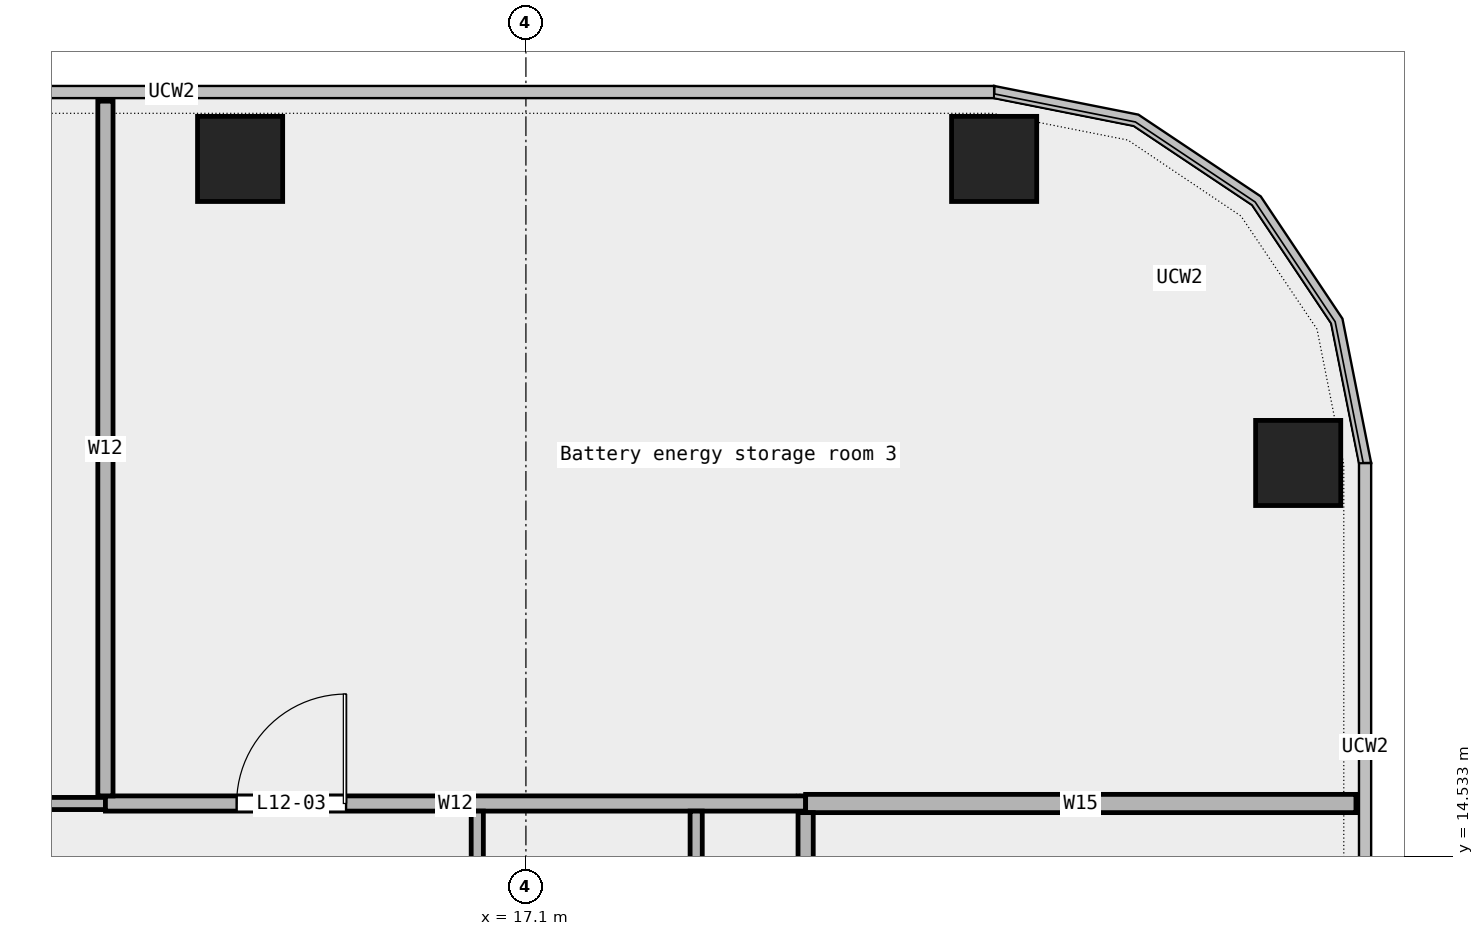
"""IFC4 building model, lengths in metres.
Left out: names, types, materials, properties, quantities, classifications, styles, units other than length and angle.
Written with IfcOpenShell. Run it as: python <this file> out.ifc"""

import sys

from ifc_helpers import new_model, si_unit, direction, frame, frame_2d, origin, origin_2d, place, context, subcontext, project, spatial, rectangle, extrude, element, fill, save


model = new_model("IFC4")
c1 = context("Model", 3, precision=1e-05, world=origin(), true_north=direction((0.0, 1.0)))
c2 = subcontext(c1, "Body", "Model", "MODEL_VIEW")
j1 = project(units=[si_unit("LENGTHUNIT", "METRE"), si_unit("PLANEANGLEUNIT", "RADIAN")], contexts=[c1])
p1 = place(None, origin())
s1 = spatial("IfcSite", under=j1, at=p1, CompositionType="ELEMENT")
p2 = place(p1, origin())
s2 = spatial("IfcBuilding", under=s1, at=p2, CompositionType="ELEMENT")
p3 = place(p2, frame((0.0, 0.0, 64.6)))
s3 = spatial("IfcBuildingStorey", under=s2, at=p3, CompositionType="ELEMENT", Elevation=64.6)
for number, where, z_axis, x_axis in (
    (1, (29.8, 21.0, 0.0), (0.0, 0.0, 1.0), (1.0, 0.0, 0.0)),
    (2, (24.8, 26.0, 0.0), (0.0, 0.0, 1.0), (1.0, 0.0, 0.0)),
    (3, (12.4, 26.0, 0.0), (0.0, 0.0, 1.0), (1.0, 0.0, 0.0)),
):
    element("IfcColumn", number, at=place(p3, frame(where, z_axis=z_axis, x_axis=x_axis)), inside=s3, PredefinedType="COLUMN", context=c2, shape_type="SweptSolid", body=[
        extrude(rectangle(XDim=1.4, YDim=1.4, at=origin_2d()), origin(), (0.0, 0.0, 1.0), 4.35),
    ])
p4 = place(p3, frame((-15.78, 15.4, 0.0), z_axis=(0.0, 0.0, 1.0), x_axis=(1.0, 0.0, 0.0)))
e4 = element("IfcWall", 4, at=p4, inside=s3, PredefinedType="PARTITIONING", context=c2, shape_type="SweptSolid", body=[
    extrude(rectangle(XDim=25.965, YDim=0.2, at=frame_2d((12.982, 0.0))), origin(), (0.0, 0.0, 1.0), 4.35),
])
p5 = place(p4, frame((19.395, 0.0, 0.0)))
e5 = element("IfcOpeningElement", 5, at=p5, cuts=e4, PredefinedType="OPENING", context=c2, shape_type="SweptSolid", body=[
    extrude(rectangle(XDim=1.5, YDim=2.1, at=frame_2d((0.75, 1.05))), frame((0.0, 0.112, 0.0), z_axis=(0.0, -1.0, 0.0), x_axis=(1.0, 0.0, 0.0)), (0.0, 0.0, 1.0), 0.224),
])
p6 = place(p4, frame((6.012, 0.0, 0.0)))
e6 = element("IfcOpeningElement", 6, at=p6, cuts=e4, PredefinedType="OPENING", context=c2, shape_type="SweptSolid", body=[
    extrude(rectangle(XDim=1.5, YDim=2.1, at=frame_2d((0.75, 1.05))), frame((0.0, 0.112, 0.0), z_axis=(0.0, -1.0, 0.0), x_axis=(1.0, 0.0, 0.0)), (0.0, 0.0, 1.0), 0.224),
])
p7 = place(p3, frame((10.185, 15.4, 0.0), z_axis=(0.0, 0.0, 1.0), x_axis=(1.0, 0.0, 0.0)))
e7 = element("IfcWall", 7, at=p7, inside=s3, PredefinedType="PARTITIONING", context=c2, shape_type="SweptSolid", body=[
    extrude(rectangle(XDim=11.515, YDim=0.25, at=frame_2d((5.757, 0.0))), origin(), (0.0, 0.0, 1.0), 4.35),
])
p8 = place(p7, frame((2.157, 0.0, 0.0)))
e8 = element("IfcOpeningElement", 8, at=p8, cuts=e7, PredefinedType="OPENING", context=c2, shape_type="SweptSolid", body=[
    extrude(rectangle(XDim=1.8, YDim=2.1, at=frame_2d((0.9, 1.05))), frame((0.0, 0.137, 0.0), z_axis=(0.0, -1.0, 0.0), x_axis=(1.0, 0.0, 0.0)), (0.0, 0.0, 1.0), 0.274),
])
p9 = place(p3, frame((21.7, 15.4, 0.0), z_axis=(0.0, 0.0, 1.0), x_axis=(1.0, 0.0, 0.0)))
e9 = element("IfcWall", 9, at=p9, inside=s3, PredefinedType="PARTITIONING", context=c2, shape_type="SweptSolid", body=[
    extrude(rectangle(XDim=9.05, YDim=0.3, at=frame_2d((4.525, 0.0))), origin(), (0.0, 0.0, 1.0), 4.35),
])
p10 = place(p3, frame((10.185, 15.525, 0.0), z_axis=(0.0, 0.0, 1.0), x_axis=(0.0, 1.0, 0.0)))
e10 = element("IfcWall", 10, at=p10, inside=s3, PredefinedType="PARTITIONING", context=c2, shape_type="SweptSolid", body=[
    extrude(rectangle(XDim=11.425, YDim=0.25, at=frame_2d((5.712, 0.0))), origin(), (0.0, 0.0, 1.0), 4.35),
])
p11 = place(p3, frame((16.3, 11.8, 0.0), z_axis=(0.0, 0.0, 1.0), x_axis=(0.0, 1.0, 0.0)))
e11 = element("IfcWall", 11, at=p11, inside=s3, PredefinedType="PARTITIONING", context=c2, shape_type="SweptSolid", body=[
    extrude(rectangle(XDim=3.475, YDim=0.2, at=frame_2d((1.737, 0.0))), origin(), (0.0, 0.0, 1.0), 4.35),
])
p12 = place(p3, frame((19.9, 8.18, 0.0), z_axis=(0.0, 0.0, 1.0), x_axis=(0.0, 1.0, 0.0)))
e12 = element("IfcWall", 12, at=p12, inside=s3, PredefinedType="PARTITIONING", context=c2, shape_type="SweptSolid", body=[
    extrude(rectangle(XDim=7.095, YDim=0.2, at=frame_2d((3.547, 0.0))), origin(), (0.0, 0.0, 1.0), 4.35),
])
p13 = place(p12, frame((3.097, 0.0, 0.0)))
e13 = element("IfcOpeningElement", 13, at=p13, cuts=e12, PredefinedType="OPENING", context=c2, shape_type="SweptSolid", body=[
    extrude(rectangle(XDim=0.9, YDim=2.1, at=frame_2d((0.45, 1.05))), frame((0.0, 0.112, 0.0), z_axis=(0.0, -1.0, 0.0), x_axis=(1.0, 0.0, 0.0)), (0.0, 0.0, 1.0), 0.224),
])
p14 = place(p3, frame((21.7, 11.79, 0.0), z_axis=(0.0, 0.0, 1.0), x_axis=(0.0, 1.0, 0.0)))
e14 = element("IfcWall", 14, at=p14, inside=s3, PredefinedType="PARTITIONING", context=c2, shape_type="SweptSolid", body=[
    extrude(rectangle(XDim=3.46, YDim=0.25, at=frame_2d((1.73, 0.0))), origin(), (0.0, 0.0, 1.0), 4.35),
])
p15 = place(p14, frame((1.28, 0.0, 0.0)))
e15 = element("IfcOpeningElement", 15, at=p15, cuts=e14, PredefinedType="OPENING", context=c2, shape_type="SweptSolid", body=[
    extrude(rectangle(XDim=0.9, YDim=2.1, at=frame_2d((0.45, 1.05))), frame((0.0, 0.137, 0.0), z_axis=(0.0, -1.0, 0.0), x_axis=(1.0, 0.0, 0.0)), (0.0, 0.0, 1.0), 0.274),
])
p16 = place(p8, origin())
e16 = element("IfcDoor", 16, at=p16, inside=s3, OperationType="DOUBLE_DOOR_SINGLE_SWING", PredefinedType="DOOR", context=c2, shape_type="SweptSolid", body=[
    extrude(rectangle(XDim=1.8, YDim=2.1, at=frame_2d((0.9, 1.05))), frame((0.0, 0.025, 0.0), z_axis=(0.0, -1.0, 0.0), x_axis=(1.0, 0.0, 0.0)), (0.0, 0.0, 1.0), 0.05),
])
fill(e8, e16)
save(model, sys.argv[1])
